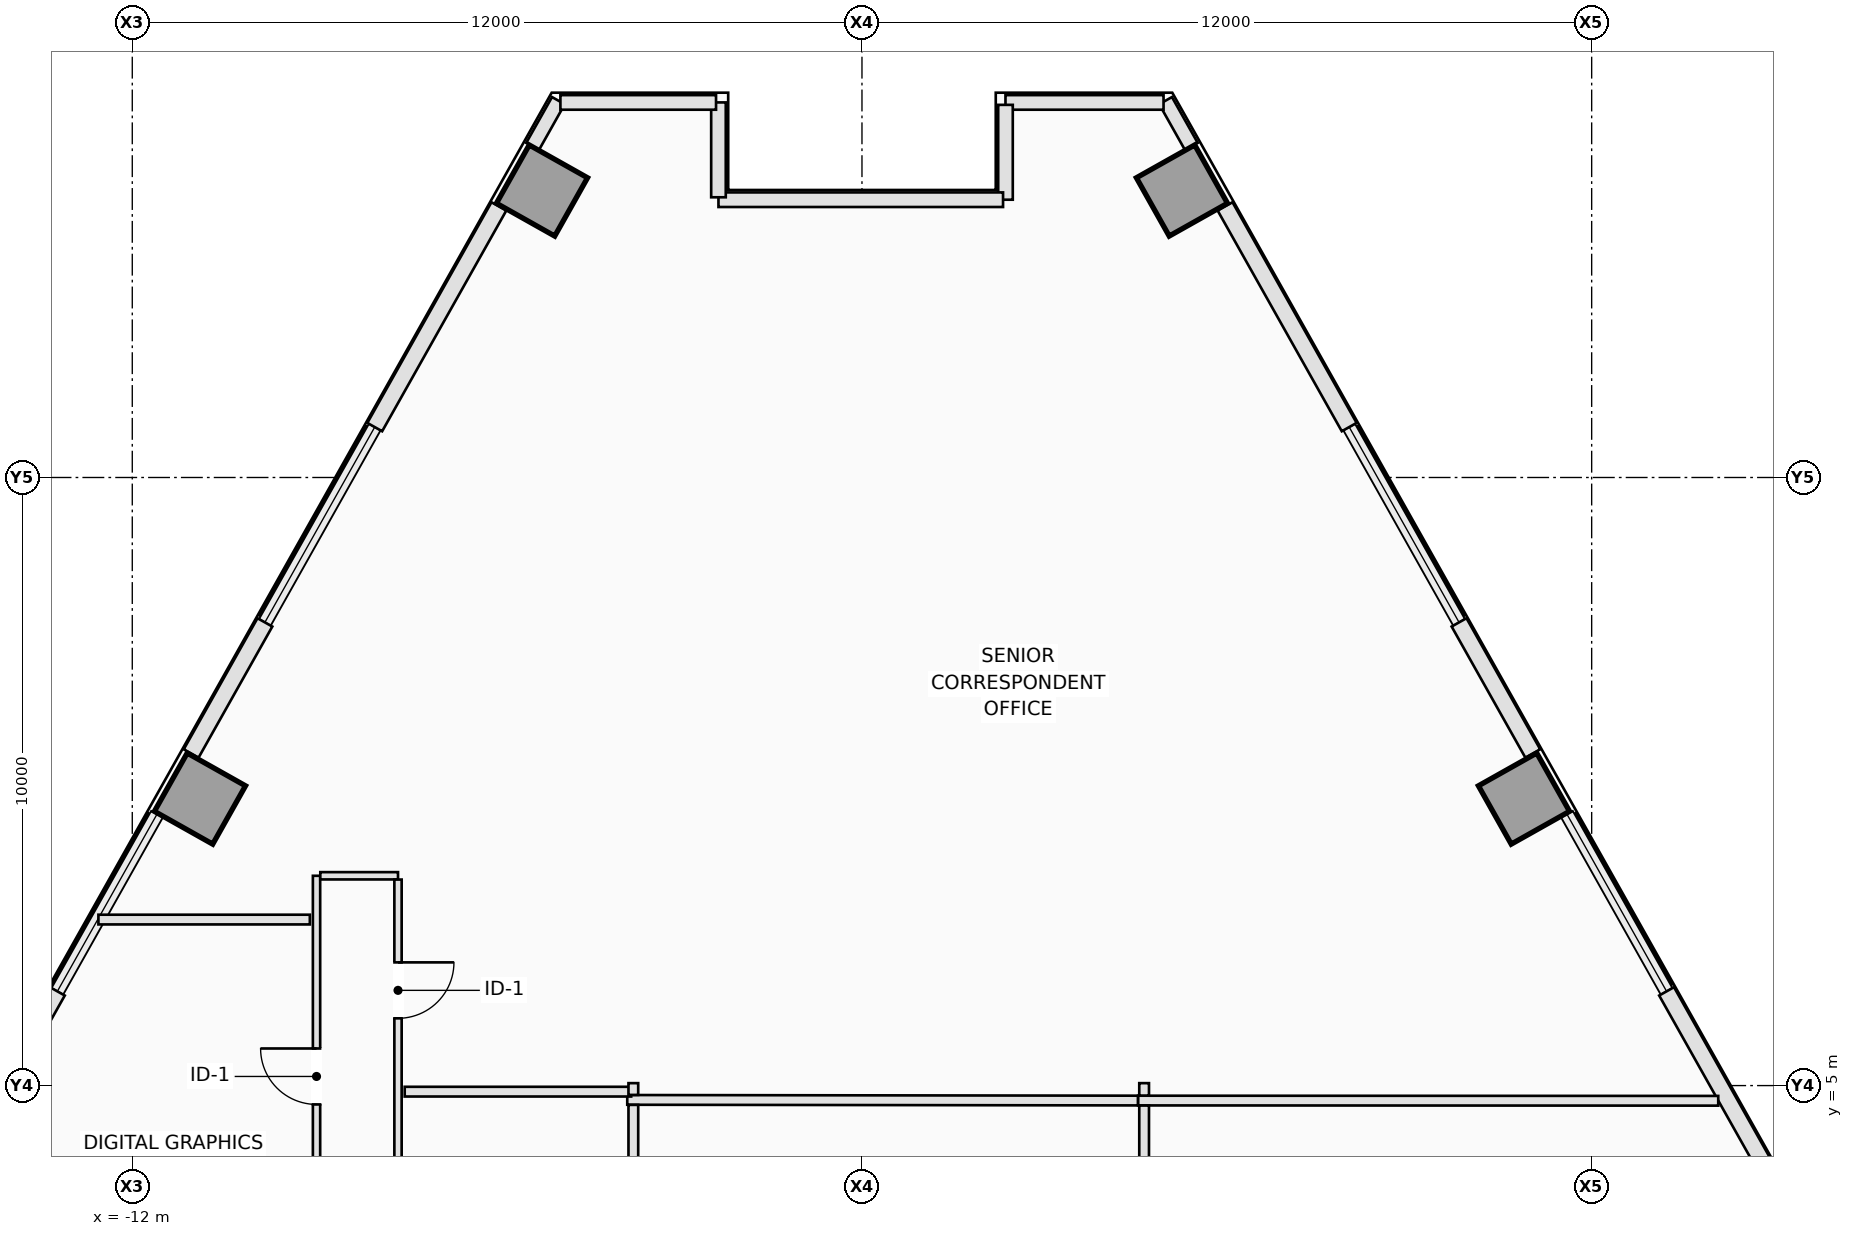
"""IFC4 building model, lengths in metres.
Left out: names, types, materials, properties, quantities, classifications, styles, units other than length and angle.
Written with IfcOpenShell. Run it as: python <this file> out.ifc"""

import sys

from ifc_helpers import new_model, si_unit, direction, frame, frame_2d, origin, origin_2d, place, context, subcontext, project, spatial, rectangle, extrude, element, fill, save


model = new_model("IFC4")
c1 = context("Model", 3, precision=1e-05, world=origin(), true_north=direction((0.0, 1.0)))
c2 = subcontext(c1, "Body", "Model", "MODEL_VIEW")
j1 = project(units=[si_unit("LENGTHUNIT", "METRE"), si_unit("PLANEANGLEUNIT", "RADIAN")], contexts=[c1])
p1 = place(None, origin())
s1 = spatial("IfcSite", under=j1, at=p1, CompositionType="ELEMENT")
p2 = place(p1, origin())
s2 = spatial("IfcBuilding", under=s1, at=p2, CompositionType="ELEMENT")
p3 = place(p2, frame((0.0, 0.0, 123.0)))
s3 = spatial("IfcBuildingStorey", under=s2, at=p3, CompositionType="ELEMENT", Elevation=123.0)
for number, where, z_axis, x_axis in (
    (1, (10.887, 9.72, 0.0), (0.0, 0.0, 1.0), (0.872, 0.49, 0.0)),
    (2, (5.262, 19.719, 0.0), (0.0, 0.0, 1.0), (0.872, 0.49, 0.0)),
    (3, (-5.262, 19.719, 0.0), (0.0, 0.0, 1.0), (-0.872, 0.49, 0.0)),
    (4, (-10.887, 9.72, 0.0), (0.0, 0.0, 1.0), (-0.872, 0.49, 0.0)),
):
    element("IfcColumn", number, at=place(p3, frame(where, z_axis=z_axis, x_axis=x_axis)), inside=s3, PredefinedType="COLUMN", context=c2, shape_type="SweptSolid", body=[
        extrude(rectangle(XDim=1.1, YDim=1.1, at=origin_2d()), origin(), (0.0, 0.0, 1.0), 3.5),
    ])
p4 = place(p3, frame((4.993, 21.197, 0.0), z_axis=(0.0, 0.0, 1.0), x_axis=(0.490355003566, -0.871522788272, 0.0)))
e5 = element("IfcWall", 5, at=p4, inside=s3, PredefinedType="STANDARD", context=c2, shape_type="SweptSolid", body=[
    extrude(rectangle(XDim=0.865, YDim=0.24, at=frame_2d((0.433, 0.0))), origin(), (0.0, 0.0, 1.0), 3.25),
])
p5 = place(p3, frame((5.971, 19.458, 0.0), z_axis=(0.0, 0.0, 1.0), x_axis=(0.490280725514, -0.87156457603, 0.0)))
e6 = element("IfcWall", 6, at=p5, inside=s3, PredefinedType="STANDARD", context=c2, shape_type="SweptSolid", body=[
    extrude(rectangle(XDim=4.164, YDim=0.28, at=frame_2d((2.082, 0.0))), origin(), (0.0, 0.0, 1.0), 3.25),
])
p6 = place(p3, frame((9.819, 12.617, 0.0), z_axis=(0.0, 0.0, 1.0), x_axis=(0.490303410255, -0.871551814807, 0.0)))
e7 = element("IfcWall", 7, at=p6, inside=s3, PredefinedType="STANDARD", context=c2, shape_type="SweptSolid", body=[
    extrude(rectangle(XDim=2.474, YDim=0.28, at=frame_2d((1.237, 0.0))), origin(), (0.0, 0.0, 1.0), 3.25),
])
p7 = place(p3, frame((13.232, 6.55, 0.0), z_axis=(0.0, 0.0, 1.0), x_axis=(0.490310760781, -0.871547679626, 0.0)))
e8 = element("IfcWall", 8, at=p7, inside=s3, PredefinedType="STANDARD", context=c2, shape_type="SweptSolid", body=[
    extrude(rectangle(XDim=3.277, YDim=0.28, at=frame_2d((1.638, 0.0))), origin(), (0.0, 0.0, 1.0), 3.25),
])
p8 = place(p3, frame((-5.417, 20.443, 0.0), z_axis=(0.0, 0.0, 1.0), x_axis=(0.490355003566, 0.871522788272, 0.0)))
e9 = element("IfcWall", 9, at=p8, inside=s3, PredefinedType="STANDARD", context=c2, shape_type="SweptSolid", body=[
    extrude(rectangle(XDim=0.865, YDim=0.24, at=frame_2d((0.433, 0.0))), origin(), (0.0, 0.0, 1.0), 3.25),
])
p9 = place(p3, frame((-11.032, 10.461, 0.0), z_axis=(0.0, 0.0, 1.0), x_axis=(0.490303410255, 0.871551814807, 0.0)))
e10 = element("IfcWall", 10, at=p9, inside=s3, PredefinedType="STANDARD", context=c2, shape_type="SweptSolid", body=[
    extrude(rectangle(XDim=2.474, YDim=0.28, at=frame_2d((1.237, 0.0))), origin(), (0.0, 0.0, 1.0), 3.25),
])
p10 = place(p3, frame((-8.013, 15.829, 0.0), z_axis=(0.0, 0.0, 1.0), x_axis=(0.490280725514, 0.87156457603, 0.0)))
e11 = element("IfcWall", 11, at=p10, inside=s3, PredefinedType="STANDARD", context=c2, shape_type="SweptSolid", body=[
    extrude(rectangle(XDim=4.164, YDim=0.28, at=frame_2d((2.082, 0.0))), origin(), (0.0, 0.0, 1.0), 3.25),
])
p11 = place(p3, frame((-14.839, 3.694, 0.0), z_axis=(0.0, 0.0, 1.0), x_axis=(0.490310760781, 0.871547679626, 0.0)))
e12 = element("IfcWall", 12, at=p11, inside=s3, PredefinedType="STANDARD", context=c2, shape_type="SweptSolid", body=[
    extrude(rectangle(XDim=3.277, YDim=0.28, at=frame_2d((1.638, 0.0))), origin(), (0.0, 0.0, 1.0), 3.25),
])
p12 = place(p3, frame((4.959, 21.168, 0.0), z_axis=(0.0, 0.0, 1.0), x_axis=(-1.0, 0.0, 0.0)))
e13 = element("IfcWall", 13, at=p12, inside=s3, PredefinedType="STANDARD", context=c2, shape_type="SweptSolid", body=[
    extrude(rectangle(XDim=2.599, YDim=0.24, at=frame_2d((1.3, 0.0))), origin(), (0.0, 0.0, 1.0), 3.25),
])
p13 = place(p3, frame((2.36, 21.128, 0.0), z_axis=(0.0, 0.0, 1.0), x_axis=(0.0, -1.0, 0.0)))
e14 = element("IfcWall", 14, at=p13, inside=s3, PredefinedType="STANDARD", context=c2, shape_type="SweptSolid", body=[
    extrude(rectangle(XDim=1.56, YDim=0.24, at=frame_2d((0.78, 0.0))), origin(), (0.0, 0.0, 1.0), 3.25),
])
p14 = place(p3, frame((2.32, 19.568, 0.0), z_axis=(0.0, 0.0, 1.0), x_axis=(-1.0, 0.0, 0.0)))
e15 = element("IfcWall", 15, at=p14, inside=s3, PredefinedType="STANDARD", context=c2, shape_type="SweptSolid", body=[
    extrude(rectangle(XDim=4.68, YDim=0.24, at=frame_2d((2.34, 0.0))), origin(), (0.0, 0.0, 1.0), 2.722),
])
p15 = place(p3, frame((-2.36, 19.608, 0.0), z_axis=(0.0, 0.0, 1.0), x_axis=(0.0, 1.0, 0.0)))
e16 = element("IfcWall", 16, at=p15, inside=s3, PredefinedType="STANDARD", context=c2, shape_type="SweptSolid", body=[
    extrude(rectangle(XDim=1.56, YDim=0.24, at=frame_2d((0.78, 0.0))), origin(), (0.0, 0.0, 1.0), 3.25),
])
p16 = place(p3, frame((-2.4, 21.168, 0.0), z_axis=(0.0, 0.0, 1.0), x_axis=(-1.0, 0.0, 0.0)))
e17 = element("IfcWall", 17, at=p16, inside=s3, PredefinedType="STANDARD", context=c2, shape_type="SweptSolid", body=[
    extrude(rectangle(XDim=2.56, YDim=0.24, at=frame_2d((1.28, 0.0))), origin(), (0.0, 0.0, 1.0), 3.25),
])
p17 = place(p3, frame((-8.97, -2.338, 0.0), z_axis=(0.0, 0.0, 1.0), x_axis=(0.0, 1.0, 0.0)))
e18 = element("IfcWall", 18, at=p17, inside=s3, PredefinedType="PARTITIONING", context=c2, shape_type="SweptSolid", body=[
    extrude(rectangle(XDim=10.788, YDim=0.12, at=frame_2d((5.394, 0.0))), origin(), (0.0, 0.0, 1.0), 3.25),
])
p18 = place(p17, frame((7.028, 0.0, 0.0)))
e19 = element("IfcOpeningElement", 19, at=p18, cuts=e18, PredefinedType="OPENING", context=c2, shape_type="SweptSolid", body=[
    extrude(rectangle(XDim=0.92, YDim=2.12, at=frame_2d((0.46, 1.06))), frame((0.0, 0.07, 0.0), z_axis=(0.0, -1.0, 0.0), x_axis=(1.0, 0.0, 0.0)), (0.0, 0.0, 1.0), 0.14),
])
p19 = place(p17, frame((3.24, 0.0, 0.0)))
e20 = element("IfcOpeningElement", 20, at=p19, cuts=e18, PredefinedType="OPENING", context=c2, shape_type="SweptSolid", body=[
    extrude(rectangle(XDim=0.92, YDim=2.12, at=frame_2d((0.46, 1.06))), frame((0.0, 0.07, 0.0), z_axis=(0.0, -1.0, 0.0), x_axis=(1.0, 0.0, 0.0)), (0.0, 0.0, 1.0), 0.14),
])
p20 = place(p3, frame((-8.908, 8.45, 0.0), z_axis=(0.0, 0.0, 1.0), x_axis=(1.0, 0.0, 0.0)))
e21 = element("IfcWall", 21, at=p20, inside=s3, PredefinedType="PARTITIONING", context=c2, shape_type="SweptSolid", body=[
    extrude(rectangle(XDim=1.278, YDim=0.12, at=frame_2d((0.639, 0.0))), origin(), (0.0, 0.0, 1.0), 3.25),
])
p21 = place(p3, frame((-7.63, 8.388, 0.0), z_axis=(0.0, 0.0, 1.0), x_axis=(0.0, -1.0, 0.0)))
e22 = element("IfcWall", 22, at=p21, inside=s3, PredefinedType="PARTITIONING", context=c2, shape_type="SweptSolid", body=[
    extrude(rectangle(XDim=10.788, YDim=0.12, at=frame_2d((5.394, 0.0))), origin(), (0.0, 0.0, 1.0), 3.25),
])
p22 = place(p21, frame((1.362, 0.0, 0.0)))
e23 = element("IfcOpeningElement", 23, at=p22, cuts=e22, PredefinedType="OPENING", context=c2, shape_type="SweptSolid", body=[
    extrude(rectangle(XDim=0.92, YDim=2.12, at=frame_2d((0.46, 1.06))), frame((0.0, 0.07, 0.0), z_axis=(0.0, -1.0, 0.0), x_axis=(1.0, 0.0, 0.0)), (0.0, 0.0, 1.0), 0.14),
])
p23 = place(p21, frame((6.549, 0.0, 0.0)))
e24 = element("IfcOpeningElement", 24, at=p23, cuts=e22, PredefinedType="OPENING", context=c2, shape_type="SweptSolid", body=[
    extrude(rectangle(XDim=0.92, YDim=2.12, at=frame_2d((0.46, 1.06))), frame((0.0, 0.07, 0.0), z_axis=(0.0, -1.0, 0.0), x_axis=(1.0, 0.0, 0.0)), (0.0, 0.0, 1.0), 0.14),
])
p24 = place(p3, frame((-9.08, 7.73, 0.0), z_axis=(0.0, 0.0, 1.0), x_axis=(-1.0, 0.0, 0.0)))
e25 = element("IfcWall", 25, at=p24, inside=s3, PredefinedType="PARTITIONING", context=c2, shape_type="SweptSolid", body=[
    extrude(rectangle(XDim=3.477, YDim=0.16, at=frame_2d((1.738, 0.0))), origin(), (0.0, 0.0, 1.0), 3.25),
])
p25 = place(p3, frame((14.082, 4.75, 0.0), z_axis=(0.0, 0.0, 1.0), x_axis=(-0.999999926346, 0.000383808375, 0.0)))
e26 = element("IfcWall", 26, at=p25, inside=s3, PredefinedType="PARTITIONING", context=c2, shape_type="SweptSolid", body=[
    extrude(rectangle(XDim=9.542, YDim=0.16, at=frame_2d((4.771, 0.0))), origin(), (0.0, 0.0, 1.0), 3.25),
])
p26 = place(p3, frame((4.538, 4.754, 0.0), z_axis=(0.0, 0.0, 1.0), x_axis=(-0.999999181944, 0.001279105904, 0.0)))
e27 = element("IfcWall", 27, at=p26, inside=s3, PredefinedType="PARTITIONING", context=c2, shape_type="SweptSolid", body=[
    extrude(rectangle(XDim=8.398, YDim=0.16, at=frame_2d((4.199, 0.0))), origin(), (0.0, 0.0, 1.0), 3.25),
])
p27 = place(p3, frame((-3.795, 4.9, 0.0), z_axis=(0.0, 0.0, 1.0), x_axis=(-1.0, 0.0, 0.0)))
e28 = element("IfcWall", 28, at=p27, inside=s3, PredefinedType="PARTITIONING", context=c2, shape_type="SweptSolid", body=[
    extrude(rectangle(XDim=3.725, YDim=0.16, at=frame_2d((1.862, 0.0))), origin(), (0.0, 0.0, 1.0), 2.891),
])
p28 = place(p3, frame((4.64, 0.472, 0.0), z_axis=(0.0, 0.0, 1.0), x_axis=(0.0, 1.0, 0.0)))
e29 = element("IfcWall", 29, at=p28, inside=s3, PredefinedType="PARTITIONING", context=c2, shape_type="SweptSolid", body=[
    extrude(rectangle(XDim=4.2, YDim=0.16, at=frame_2d((2.1, 0.0))), origin(), (0.0, 0.0, 1.0), 3.25),
])
p29 = place(p3, frame((4.64, 4.836, 0.0), z_axis=(0.0, 0.0, 1.0), x_axis=(0.0, 1.0, 0.0)))
e30 = element("IfcWall", 30, at=p29, inside=s3, PredefinedType="PARTITIONING", context=c2, shape_type="SweptSolid", body=[
    extrude(rectangle(XDim=0.204, YDim=0.16, at=frame_2d((0.102, 0.0))), origin(), (0.0, 0.0, 1.0), 3.25),
])
p30 = place(p3, frame((-3.76, 0.17, 0.0), z_axis=(0.0, 0.0, 1.0), x_axis=(0.0, 1.0, 0.0)))
e31 = element("IfcWall", 31, at=p30, inside=s3, PredefinedType="PARTITIONING", context=c2, shape_type="SweptSolid", body=[
    extrude(rectangle(XDim=4.513, YDim=0.16, at=frame_2d((2.256, 0.0))), origin(), (0.0, 0.0, 1.0), 3.25),
])
p31 = place(p3, frame((-3.76, 4.847, 0.0), z_axis=(0.0, 0.0, 1.0), x_axis=(0.0, 1.0, 0.0)))
e32 = element("IfcWall", 32, at=p31, inside=s3, PredefinedType="PARTITIONING", context=c2, shape_type="SweptSolid", body=[
    extrude(rectangle(XDim=0.193, YDim=0.16, at=frame_2d((0.097, 0.0))), origin(), (0.0, 0.0, 1.0), 3.25),
])
p32 = place(p22, origin())
e33 = element("IfcDoor", 33, at=p32, inside=s3, OperationType="SINGLE_SWING_LEFT", PredefinedType="DOOR", context=c2, shape_type="SweptSolid", body=[
    extrude(rectangle(XDim=0.92, YDim=2.12, at=frame_2d((0.46, 1.06))), frame((0.0, 0.025, 0.0), z_axis=(0.0, -1.0, 0.0), x_axis=(1.0, 0.0, 0.0)), (0.0, 0.0, 1.0), 0.05),
])
fill(e23, e33)
p33 = place(p18, origin())
e34 = element("IfcDoor", 34, at=p33, inside=s3, OperationType="SINGLE_SWING_RIGHT", PredefinedType="DOOR", context=c2, shape_type="SweptSolid", body=[
    extrude(rectangle(XDim=0.92, YDim=2.12, at=frame_2d((0.46, 1.06))), frame((0.0, 0.025, 0.0), z_axis=(0.0, -1.0, 0.0), x_axis=(1.0, 0.0, 0.0)), (0.0, 0.0, 1.0), 0.05),
])
fill(e19, e34)
save(model, sys.argv[1])
